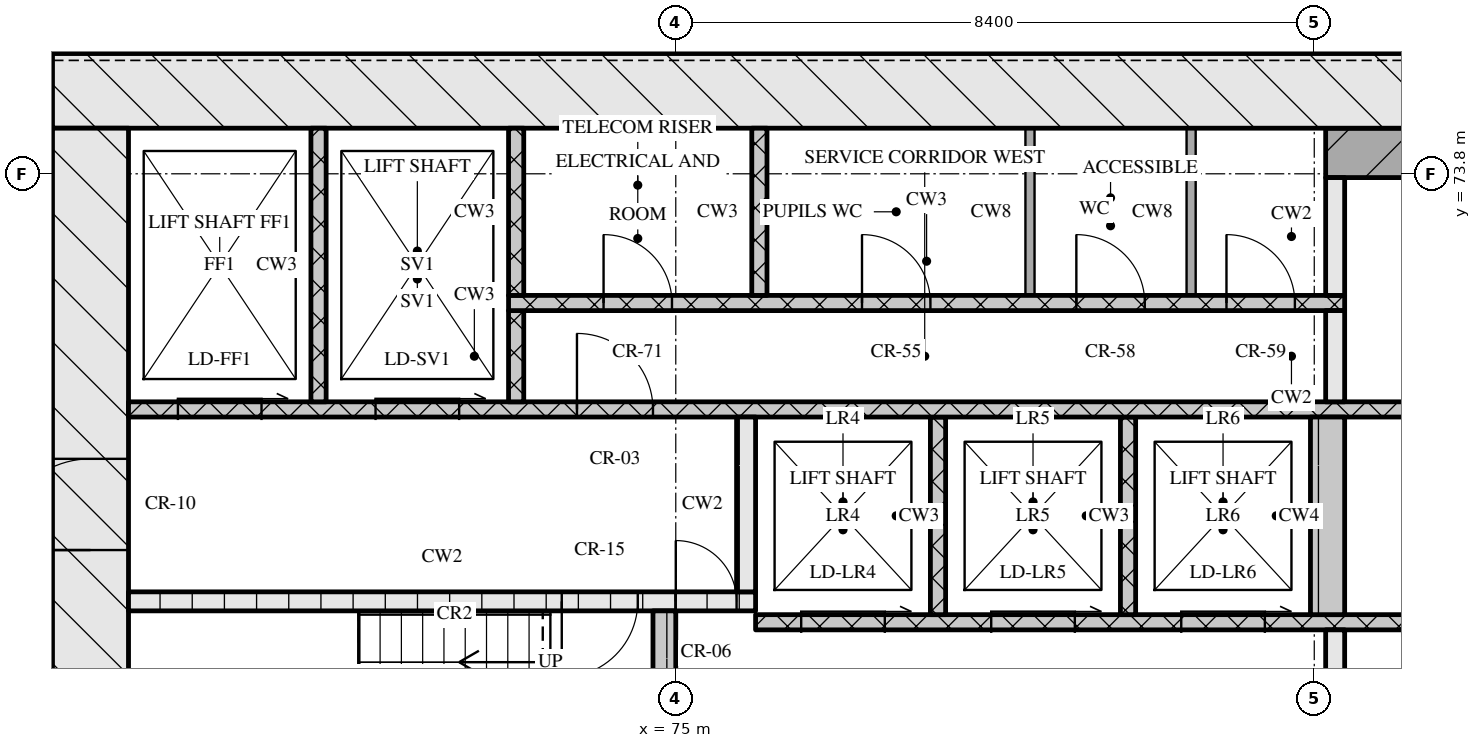
"""IFC4 building model, lengths in metres.
Left out: names, types, materials, properties, quantities, classifications, styles, units other than length and angle.
Written with IfcOpenShell. Run it as: python <this file> out.ifc"""

import sys

from ifc_helpers import new_model, si_unit, direction, frame, frame_2d, origin, place, context, subcontext, project, spatial, rectangle, extrude, element, fill, save


model = new_model("IFC4")
c1 = context("Model", 3, precision=1e-05, world=origin(), true_north=direction((0.0, 1.0)))
c2 = subcontext(c1, "Body", "Model", "MODEL_VIEW")
j1 = project(units=[si_unit("LENGTHUNIT", "METRE"), si_unit("PLANEANGLEUNIT", "RADIAN")], contexts=[c1])
p1 = place(None, origin())
s1 = spatial("IfcSite", under=j1, at=p1, CompositionType="ELEMENT")
p2 = place(p1, origin())
s2 = spatial("IfcBuilding", under=s1, at=p2, CompositionType="ELEMENT")
p3 = place(p2, frame((0.0, 0.0, 113.25)))
s3 = spatial("IfcBuildingStorey", under=s2, at=p3, CompositionType="ELEMENT", Elevation=113.25)
p4 = place(p3, frame((66.8, 74.9, 0.0), z_axis=(0.0, 0.0, 1.0), x_axis=(1.0, 0.0, 0.0)))
e1 = element("IfcWall", 1, at=p4, inside=s3, PredefinedType="SOLIDWALL", context=c2, shape_type="SweptSolid", body=[
    extrude(rectangle(XDim=41.6, YDim=1.0, at=frame_2d((20.8, 0.0))), origin(), (0.0, 0.0, 1.0), 3.32),
])
p5 = place(p3, frame((67.3, 62.4, 0.0), z_axis=(0.0, 0.0, 1.0), x_axis=(0.0, 1.0, 0.0)))
e2 = element("IfcWall", 2, at=p5, inside=s3, PredefinedType="SOLIDWALL", context=c2, shape_type="SweptSolid", body=[
    extrude(rectangle(XDim=12.0, YDim=1.0, at=frame_2d((6.0, 0.0))), origin(), (0.0, 0.0, 1.0), 3.32),
])
p6 = place(p5, frame((6.45, 0.0, 0.0)))
e3 = element("IfcOpeningElement", 3, at=p6, cuts=e2, PredefinedType="OPENING", context=c2, shape_type="SweptSolid", body=[
    extrude(rectangle(XDim=1.2, YDim=2.1, at=frame_2d((0.6, 1.05))), frame((0.0, 0.51, 0.0), z_axis=(0.0, -1.0, 0.0), x_axis=(1.0, 0.0, 0.0)), (0.0, 0.0, 1.0), 1.02),
])
p7 = place(p3, frame((74.85, 65.2, 0.0), z_axis=(0.0, 0.0, 1.0), x_axis=(0.0, 1.0, 0.0)))
e4 = element("IfcWall", 4, at=p7, inside=s3, PredefinedType="SOLIDWALL", context=c2, shape_type="SweptSolid", body=[
    extrude(rectangle(XDim=2.85, YDim=0.3, at=frame_2d((1.425, 0.0))), origin(), (0.0, 0.0, 1.0), 3.32),
])
p8 = place(p3, frame((83.675, 65.2, 0.0), z_axis=(0.0, 0.0, 1.0), x_axis=(0.0, 1.0, 0.0)))
e5 = element("IfcWall", 5, at=p8, inside=s3, PredefinedType="SOLIDWALL", context=c2, shape_type="SweptSolid", body=[
    extrude(rectangle(XDim=2.6, YDim=0.25, at=frame_2d((1.3, 0.0))), origin(), (0.0, 0.0, 1.0), 3.32),
])
p9 = place(p8, frame((0.7, 0.0, 0.0)))
e6 = element("IfcOpeningElement", 6, at=p9, cuts=e5, PredefinedType="OPENING", context=c2, shape_type="SweptSolid", body=[
    extrude(rectangle(XDim=1.2, YDim=2.1, at=frame_2d((0.6, 1.05))), frame((0.0, 0.135, 0.0), z_axis=(0.0, -1.0, 0.0), x_axis=(1.0, 0.0, 0.0)), (0.0, 0.0, 1.0), 0.27),
])
p10 = place(p3, frame((76.05, 67.9, 0.0), z_axis=(0.0, 0.0, 1.0), x_axis=(1.0, 0.0, 0.0)))
e7 = element("IfcWall", 7, at=p10, inside=s3, PredefinedType="SOLIDWALL", context=c2, shape_type="SweptSolid", body=[
    extrude(rectangle(XDim=23.1, YDim=0.2, at=frame_2d((11.55, 0.0))), origin(), (0.0, 0.0, 1.0), 3.32),
])
p11 = place(p10, frame((0.6, 0.0, 0.0)))
e8 = element("IfcOpeningElement", 8, at=p11, cuts=e7, PredefinedType="OPENING", context=c2, shape_type="SweptSolid", body=[
    extrude(rectangle(XDim=1.1, YDim=2.1, at=frame_2d((0.55, 1.05))), frame((0.0, 0.11, 0.0), z_axis=(0.0, -1.0, 0.0), x_axis=(1.0, 0.0, 0.0)), (0.0, 0.0, 1.0), 0.22),
])
p12 = place(p10, frame((3.1, 0.0, 0.0)))
e9 = element("IfcOpeningElement", 9, at=p12, cuts=e7, PredefinedType="OPENING", context=c2, shape_type="SweptSolid", body=[
    extrude(rectangle(XDim=1.1, YDim=2.1, at=frame_2d((0.55, 1.05))), frame((0.0, 0.11, 0.0), z_axis=(0.0, -1.0, 0.0), x_axis=(1.0, 0.0, 0.0)), (0.0, 0.0, 1.0), 0.22),
])
p13 = place(p10, frame((5.6, 0.0, 0.0)))
e10 = element("IfcOpeningElement", 10, at=p13, cuts=e7, PredefinedType="OPENING", context=c2, shape_type="SweptSolid", body=[
    extrude(rectangle(XDim=1.1, YDim=2.1, at=frame_2d((0.55, 1.05))), frame((0.0, 0.11, 0.0), z_axis=(0.0, -1.0, 0.0), x_axis=(1.0, 0.0, 0.0)), (0.0, 0.0, 1.0), 0.22),
])
p14 = place(p10, frame((9.7, 0.0, 0.0)))
e11 = element("IfcOpeningElement", 11, at=p14, cuts=e7, PredefinedType="OPENING", context=c2, shape_type="SweptSolid", body=[
    extrude(rectangle(XDim=0.9, YDim=2.1, at=frame_2d((0.45, 1.05))), frame((0.0, 0.11, 0.0), z_axis=(0.0, -1.0, 0.0), x_axis=(1.0, 0.0, 0.0)), (0.0, 0.0, 1.0), 0.22),
])
p15 = place(p10, frame((13.55, 0.0, 0.0)))
e12 = element("IfcOpeningElement", 12, at=p15, cuts=e7, PredefinedType="OPENING", context=c2, shape_type="SweptSolid", body=[
    extrude(rectangle(XDim=1.0, YDim=2.1, at=frame_2d((0.5, 1.05))), frame((0.0, 0.11, 0.0), z_axis=(0.0, -1.0, 0.0), x_axis=(1.0, 0.0, 0.0)), (0.0, 0.0, 1.0), 0.22),
])
for number, where, z_axis, x_axis in (
    (13, (78.45, 68.0, 0.0), (0.0, 0.0, 1.0), (0.0, 1.0, 0.0)),
    (14, (80.95, 68.0, 0.0), (0.0, 0.0, 1.0), (0.0, 1.0, 0.0)),
):
    element("IfcWall", number, at=place(p3, frame(where, z_axis=z_axis, x_axis=x_axis)), inside=s3, PredefinedType="SOLIDWALL", context=c2, shape_type="SweptSolid", body=[
        extrude(rectangle(XDim=2.6, YDim=0.2, at=frame_2d((1.3, 0.0))), origin(), (0.0, 0.0, 1.0), 3.32),
    ])
p16 = place(p3, frame((83.575, 68.0, 0.0), z_axis=(0.0, 0.0, 1.0), x_axis=(0.0, 1.0, 0.0)))
e15 = element("IfcWall", 15, at=p16, inside=s3, PredefinedType="SOLIDWALL", context=c2, shape_type="SweptSolid", body=[
    extrude(rectangle(XDim=2.6, YDim=0.45, at=frame_2d((1.3, 0.0))), origin(), (0.0, 0.0, 1.0), 3.32),
])
p17 = place(p3, frame((67.8, 68.175, 0.0), z_axis=(0.0, 0.0, 1.0), x_axis=(1.0, 0.0, 0.0)))
e16 = element("IfcWall", 16, at=p17, inside=s3, PredefinedType="SOLIDWALL", context=c2, shape_type="SweptSolid", body=[
    extrude(rectangle(XDim=8.25, YDim=0.25, at=frame_2d((4.125, 0.0))), origin(), (0.0, 0.0, 1.0), 3.32),
])
p18 = place(p17, frame((5.7, 0.0, 0.0)))
e17 = element("IfcOpeningElement", 17, at=p18, cuts=e16, PredefinedType="OPENING", context=c2, shape_type="SweptSolid", body=[
    extrude(rectangle(XDim=1.0, YDim=2.1, at=frame_2d((0.5, 1.05))), frame((0.0, 0.135, 0.0), z_axis=(0.0, -1.0, 0.0), x_axis=(1.0, 0.0, 0.0)), (0.0, 0.0, 1.0), 0.27),
])
p19 = place(p17, frame((7.2, 0.0, 0.0)))
e18 = element("IfcOpeningElement", 18, at=p19, cuts=e16, PredefinedType="OPENING", context=c2, shape_type="SweptSolid", body=[
    extrude(rectangle(XDim=0.8, YDim=2.1, at=frame_2d((0.4, 1.05))), frame((0.0, 0.135, 0.0), z_axis=(0.0, -1.0, 0.0), x_axis=(1.0, 0.0, 0.0)), (0.0, 0.0, 1.0), 0.27),
])
p20 = place(p3, frame((75.925, 68.3, 0.0), z_axis=(0.0, 0.0, 1.0), x_axis=(0.0, 1.0, 0.0)))
e19 = element("IfcWall", 19, at=p20, inside=s3, PredefinedType="SOLIDWALL", context=c2, shape_type="SweptSolid", body=[
    extrude(rectangle(XDim=2.3, YDim=0.25, at=frame_2d((1.15, 0.0))), origin(), (0.0, 0.0, 1.0), 3.32),
])
p21 = place(p3, frame((67.8, 70.7, 0.0), z_axis=(0.0, 0.0, 1.0), x_axis=(1.0, 0.0, 0.0)))
e20 = element("IfcWall", 20, at=p21, inside=s3, PredefinedType="SOLIDWALL", context=c2, shape_type="SweptSolid", body=[
    extrude(rectangle(XDim=39.6, YDim=0.2, at=frame_2d((19.8, 0.0))), origin(), (0.0, 0.0, 1.0), 3.32),
])
p22 = place(p21, frame((0.65, 0.0, 0.0)))
e21 = element("IfcOpeningElement", 21, at=p22, cuts=e20, PredefinedType="OPENING", context=c2, shape_type="SweptSolid", body=[
    extrude(rectangle(XDim=1.1, YDim=2.1, at=frame_2d((0.55, 1.05))), frame((0.0, 0.11, 0.0), z_axis=(0.0, -1.0, 0.0), x_axis=(1.0, 0.0, 0.0)), (0.0, 0.0, 1.0), 0.22),
])
p23 = place(p21, frame((3.25, 0.0, 0.0)))
e22 = element("IfcOpeningElement", 22, at=p23, cuts=e20, PredefinedType="OPENING", context=c2, shape_type="SweptSolid", body=[
    extrude(rectangle(XDim=1.1, YDim=2.1, at=frame_2d((0.55, 1.05))), frame((0.0, 0.11, 0.0), z_axis=(0.0, -1.0, 0.0), x_axis=(1.0, 0.0, 0.0)), (0.0, 0.0, 1.0), 0.22),
])
p24 = place(p21, frame((5.9, 0.0, 0.0)))
e23 = element("IfcOpeningElement", 23, at=p24, cuts=e20, PredefinedType="OPENING", context=c2, shape_type="SweptSolid", body=[
    extrude(rectangle(XDim=1.0, YDim=2.1, at=frame_2d((0.5, 1.05))), frame((0.0, 0.11, 0.0), z_axis=(0.0, -1.0, 0.0), x_axis=(1.0, 0.0, 0.0)), (0.0, 0.0, 1.0), 0.22),
])
p25 = place(p21, frame((21.7, 0.0, 0.0)))
e24 = element("IfcOpeningElement", 24, at=p25, cuts=e20, PredefinedType="OPENING", context=c2, shape_type="SweptSolid", body=[
    extrude(rectangle(XDim=1.0, YDim=2.1, at=frame_2d((0.5, 1.05))), frame((0.0, 0.11, 0.0), z_axis=(0.0, -1.0, 0.0), x_axis=(1.0, 0.0, 0.0)), (0.0, 0.0, 1.0), 0.22),
])
p26 = place(p21, frame((32.7, 0.0, 0.0)))
e25 = element("IfcOpeningElement", 25, at=p26, cuts=e20, PredefinedType="OPENING", context=c2, shape_type="SweptSolid", body=[
    extrude(rectangle(XDim=1.0, YDim=2.1, at=frame_2d((0.5, 1.05))), frame((0.0, 0.11, 0.0), z_axis=(0.0, -1.0, 0.0), x_axis=(1.0, 0.0, 0.0)), (0.0, 0.0, 1.0), 0.22),
])
p27 = place(p21, frame((35.25, 0.0, 0.0)))
e26 = element("IfcOpeningElement", 26, at=p27, cuts=e20, PredefinedType="OPENING", context=c2, shape_type="SweptSolid", body=[
    extrude(rectangle(XDim=1.1, YDim=2.1, at=frame_2d((0.55, 1.05))), frame((0.0, 0.11, 0.0), z_axis=(0.0, -1.0, 0.0), x_axis=(1.0, 0.0, 0.0)), (0.0, 0.0, 1.0), 0.22),
])
p28 = place(p21, frame((37.85, 0.0, 0.0)))
e27 = element("IfcOpeningElement", 27, at=p28, cuts=e20, PredefinedType="OPENING", context=c2, shape_type="SweptSolid", body=[
    extrude(rectangle(XDim=1.1, YDim=2.1, at=frame_2d((0.55, 1.05))), frame((0.0, 0.11, 0.0), z_axis=(0.0, -1.0, 0.0), x_axis=(1.0, 0.0, 0.0)), (0.0, 0.0, 1.0), 0.22),
])
p29 = place(p3, frame((70.3, 70.8, 0.0), z_axis=(0.0, 0.0, 1.0), x_axis=(0.0, 1.0, 0.0)))
e28 = element("IfcWall", 28, at=p29, inside=s3, PredefinedType="SOLIDWALL", context=c2, shape_type="SweptSolid", body=[
    extrude(rectangle(XDim=3.6, YDim=0.2, at=frame_2d((1.8, 0.0))), origin(), (0.0, 0.0, 1.0), 3.32),
])
p30 = place(p3, frame((72.9, 70.8, 0.0), z_axis=(0.0, 0.0, 1.0), x_axis=(0.0, 1.0, 0.0)))
e29 = element("IfcWall", 29, at=p30, inside=s3, PredefinedType="SOLIDWALL", context=c2, shape_type="SweptSolid", body=[
    extrude(rectangle(XDim=1.2, YDim=0.2, at=frame_2d((0.6, 0.0))), origin(), (0.0, 0.0, 1.0), 3.32),
])
p31 = place(p3, frame((83.675, 70.8, 0.0), z_axis=(0.0, 0.0, 1.0), x_axis=(0.0, 1.0, 0.0)))
e30 = element("IfcWall", 30, at=p31, inside=s3, PredefinedType="SOLIDWALL", context=c2, shape_type="SweptSolid", body=[
    extrude(rectangle(XDim=1.2, YDim=0.25, at=frame_2d((0.6, 0.0))), origin(), (0.0, 0.0, 1.0), 3.32),
])
p32 = place(p3, frame((72.8, 72.1, 0.0), z_axis=(0.0, 0.0, 1.0), x_axis=(1.0, 0.0, 0.0)))
e31 = element("IfcWall", 31, at=p32, inside=s3, PredefinedType="SOLIDWALL", context=c2, shape_type="SweptSolid", body=[
    extrude(rectangle(XDim=11.0, YDim=0.2, at=frame_2d((5.5, 0.0))), origin(), (0.0, 0.0, 1.0), 3.32),
])
p33 = place(p32, frame((1.25, 0.0, 0.0)))
e32 = element("IfcOpeningElement", 32, at=p33, cuts=e31, PredefinedType="OPENING", context=c2, shape_type="SweptSolid", body=[
    extrude(rectangle(XDim=0.9, YDim=2.1, at=frame_2d((0.45, 1.05))), frame((0.0, 0.11, 0.0), z_axis=(0.0, -1.0, 0.0), x_axis=(1.0, 0.0, 0.0)), (0.0, 0.0, 1.0), 0.22),
])
p34 = place(p32, frame((4.65, 0.0, 0.0)))
e33 = element("IfcOpeningElement", 33, at=p34, cuts=e31, PredefinedType="OPENING", context=c2, shape_type="SweptSolid", body=[
    extrude(rectangle(XDim=0.9, YDim=2.1, at=frame_2d((0.45, 1.05))), frame((0.0, 0.11, 0.0), z_axis=(0.0, -1.0, 0.0), x_axis=(1.0, 0.0, 0.0)), (0.0, 0.0, 1.0), 0.22),
])
p35 = place(p32, frame((7.47, 0.0, 0.0)))
e34 = element("IfcOpeningElement", 34, at=p35, cuts=e31, PredefinedType="OPENING", context=c2, shape_type="SweptSolid", body=[
    extrude(rectangle(XDim=0.9, YDim=2.1, at=frame_2d((0.45, 1.05))), frame((0.0, 0.11, 0.0), z_axis=(0.0, -1.0, 0.0), x_axis=(1.0, 0.0, 0.0)), (0.0, 0.0, 1.0), 0.22),
])
p36 = place(p32, frame((9.445, 0.0, 0.0)))
e35 = element("IfcOpeningElement", 35, at=p36, cuts=e31, PredefinedType="OPENING", context=c2, shape_type="SweptSolid", body=[
    extrude(rectangle(XDim=0.9, YDim=2.1, at=frame_2d((0.45, 1.05))), frame((0.0, 0.11, 0.0), z_axis=(0.0, -1.0, 0.0), x_axis=(1.0, 0.0, 0.0)), (0.0, 0.0, 1.0), 0.22),
])
for number, where, z_axis, x_axis in (
    (36, (72.9, 72.2, 0.0), (0.0, 0.0, 1.0), (0.0, 1.0, 0.0)),
    (37, (76.1, 72.2, 0.0), (0.0, 0.0, 1.0), (0.0, 1.0, 0.0)),
):
    element("IfcWall", number, at=place(p3, frame(where, z_axis=z_axis, x_axis=x_axis)), inside=s3, PredefinedType="SOLIDWALL", context=c2, shape_type="SweptSolid", body=[
        extrude(rectangle(XDim=2.2, YDim=0.2, at=frame_2d((1.1, 0.0))), origin(), (0.0, 0.0, 1.0), 3.32),
    ])
for number, where, z_axis, x_axis in (
    (38, (79.66, 72.2, 0.0), (0.0, 0.0, 1.0), (0.0, 1.0, 0.0)),
    (39, (81.78, 72.2, 0.0), (0.0, 0.0, 1.0), (0.0, 1.0, 0.0)),
):
    element("IfcWall", number, at=place(p3, frame(where, z_axis=z_axis, x_axis=x_axis)), inside=s3, PredefinedType="PARTITIONING", context=c2, shape_type="SweptSolid", body=[
        extrude(rectangle(XDim=2.2, YDim=0.12, at=frame_2d((1.1, 0.0))), origin(), (0.0, 0.0, 1.0), 3.32),
    ])
p37 = place(p3, frame((83.675, 72.2, 0.0), z_axis=(0.0, 0.0, 1.0), x_axis=(0.0, 1.0, 0.0)))
e40 = element("IfcWall", 40, at=p37, inside=s3, PredefinedType="SOLIDWALL", context=c2, shape_type="SweptSolid", body=[
    extrude(rectangle(XDim=1.55, YDim=0.25, at=frame_2d((0.775, 0.0))), origin(), (0.0, 0.0, 1.0), 3.32),
])
p38 = place(p3, frame((83.55, 74.075, 0.0), z_axis=(0.0, 0.0, 1.0), x_axis=(1.0, 0.0, 0.0)))
e41 = element("IfcWall", 41, at=p38, inside=s3, PredefinedType="SOLIDWALL", context=c2, shape_type="SweptSolid", body=[
    extrude(rectangle(XDim=8.1, YDim=0.65, at=frame_2d((4.05, 0.0))), origin(), (0.0, 0.0, 1.0), 3.32),
])
p39 = place(p11, origin())
e42 = element("IfcDoor", 42, at=p39, inside=s3, OperationType="SLIDING_TO_RIGHT", PredefinedType="DOOR", context=c2, shape_type="SweptSolid", body=[
    extrude(rectangle(XDim=1.1, YDim=2.1, at=frame_2d((0.55, 1.05))), frame((0.0, 0.025, 0.0), z_axis=(0.0, -1.0, 0.0), x_axis=(1.0, 0.0, 0.0)), (0.0, 0.0, 1.0), 0.05),
])
fill(e8, e42)
p40 = place(p12, origin())
e43 = element("IfcDoor", 43, at=p40, inside=s3, OperationType="SLIDING_TO_RIGHT", PredefinedType="DOOR", context=c2, shape_type="SweptSolid", body=[
    extrude(rectangle(XDim=1.1, YDim=2.1, at=frame_2d((0.55, 1.05))), frame((0.0, 0.025, 0.0), z_axis=(0.0, -1.0, 0.0), x_axis=(1.0, 0.0, 0.0)), (0.0, 0.0, 1.0), 0.05),
])
fill(e9, e43)
p41 = place(p13, origin())
e44 = element("IfcDoor", 44, at=p41, inside=s3, OperationType="SLIDING_TO_RIGHT", PredefinedType="DOOR", context=c2, shape_type="SweptSolid", body=[
    extrude(rectangle(XDim=1.1, YDim=2.1, at=frame_2d((0.55, 1.05))), frame((0.0, 0.025, 0.0), z_axis=(0.0, -1.0, 0.0), x_axis=(1.0, 0.0, 0.0)), (0.0, 0.0, 1.0), 0.05),
])
fill(e10, e44)
p42 = place(p18, origin())
e45 = element("IfcDoor", 45, at=p42, inside=s3, OperationType="SINGLE_SWING_RIGHT", PredefinedType="DOOR", context=c2, shape_type="SweptSolid", body=[
    extrude(rectangle(XDim=1.0, YDim=2.1, at=frame_2d((0.5, 1.05))), frame((0.0, 0.025, 0.0), z_axis=(0.0, -1.0, 0.0), x_axis=(1.0, 0.0, 0.0)), (0.0, 0.0, 1.0), 0.05),
])
fill(e17, e45)
p43 = place(p19, origin())
e46 = element("IfcDoor", 46, at=p43, inside=s3, OperationType="SINGLE_SWING_LEFT", PredefinedType="DOOR", context=c2, shape_type="SweptSolid", body=[
    extrude(rectangle(XDim=0.8, YDim=2.1, at=frame_2d((0.4, 1.05))), frame((0.0, 0.025, 0.0), z_axis=(0.0, -1.0, 0.0), x_axis=(1.0, 0.0, 0.0)), (0.0, 0.0, 1.0), 0.05),
])
fill(e18, e46)
p44 = place(p6, origin())
e47 = element("IfcDoor", 47, at=p44, inside=s3, OperationType="SINGLE_SWING_LEFT", PredefinedType="DOOR", context=c2, shape_type="SweptSolid", body=[
    extrude(rectangle(XDim=1.2, YDim=2.1, at=frame_2d((0.6, 1.05))), frame((0.0, 0.025, 0.0), z_axis=(0.0, -1.0, 0.0), x_axis=(1.0, 0.0, 0.0)), (0.0, 0.0, 1.0), 0.05),
])
fill(e3, e47)
p45 = place(p22, origin())
e48 = element("IfcDoor", 48, at=p45, inside=s3, OperationType="SLIDING_TO_RIGHT", PredefinedType="DOOR", context=c2, shape_type="SweptSolid", body=[
    extrude(rectangle(XDim=1.1, YDim=2.1, at=frame_2d((0.55, 1.05))), frame((0.0, 0.025, 0.0), z_axis=(0.0, -1.0, 0.0), x_axis=(1.0, 0.0, 0.0)), (0.0, 0.0, 1.0), 0.05),
])
fill(e21, e48)
p46 = place(p23, origin())
e49 = element("IfcDoor", 49, at=p46, inside=s3, OperationType="SLIDING_TO_RIGHT", PredefinedType="DOOR", context=c2, shape_type="SweptSolid", body=[
    extrude(rectangle(XDim=1.1, YDim=2.1, at=frame_2d((0.55, 1.05))), frame((0.0, 0.025, 0.0), z_axis=(0.0, -1.0, 0.0), x_axis=(1.0, 0.0, 0.0)), (0.0, 0.0, 1.0), 0.05),
])
fill(e22, e49)
p47 = place(p24, origin())
e50 = element("IfcDoor", 50, at=p47, inside=s3, OperationType="SINGLE_SWING_LEFT", PredefinedType="DOOR", context=c2, shape_type="SweptSolid", body=[
    extrude(rectangle(XDim=1.0, YDim=2.1, at=frame_2d((0.5, 1.05))), frame((0.0, 0.025, 0.0), z_axis=(0.0, -1.0, 0.0), x_axis=(1.0, 0.0, 0.0)), (0.0, 0.0, 1.0), 0.05),
])
fill(e23, e50)
p48 = place(p33, origin())
e51 = element("IfcDoor", 51, at=p48, inside=s3, OperationType="SINGLE_SWING_LEFT", PredefinedType="DOOR", context=c2, shape_type="SweptSolid", body=[
    extrude(rectangle(XDim=0.9, YDim=2.1, at=frame_2d((0.45, 1.05))), frame((0.0, 0.025, 0.0), z_axis=(0.0, -1.0, 0.0), x_axis=(1.0, 0.0, 0.0)), (0.0, 0.0, 1.0), 0.05),
])
fill(e32, e51)
p49 = place(p34, origin())
e52 = element("IfcDoor", 52, at=p49, inside=s3, OperationType="SINGLE_SWING_LEFT", PredefinedType="DOOR", context=c2, shape_type="SweptSolid", body=[
    extrude(rectangle(XDim=0.9, YDim=2.1, at=frame_2d((0.45, 1.05))), frame((0.0, 0.025, 0.0), z_axis=(0.0, -1.0, 0.0), x_axis=(1.0, 0.0, 0.0)), (0.0, 0.0, 1.0), 0.05),
])
fill(e33, e52)
p50 = place(p35, origin())
e53 = element("IfcDoor", 53, at=p50, inside=s3, OperationType="SINGLE_SWING_LEFT", PredefinedType="DOOR", context=c2, shape_type="SweptSolid", body=[
    extrude(rectangle(XDim=0.9, YDim=2.1, at=frame_2d((0.45, 1.05))), frame((0.0, 0.025, 0.0), z_axis=(0.0, -1.0, 0.0), x_axis=(1.0, 0.0, 0.0)), (0.0, 0.0, 1.0), 0.05),
])
fill(e34, e53)
p51 = place(p36, origin())
e54 = element("IfcDoor", 54, at=p51, inside=s3, OperationType="SINGLE_SWING_LEFT", PredefinedType="DOOR", context=c2, shape_type="SweptSolid", body=[
    extrude(rectangle(XDim=0.9, YDim=2.1, at=frame_2d((0.45, 1.05))), frame((0.0, 0.025, 0.0), z_axis=(0.0, -1.0, 0.0), x_axis=(1.0, 0.0, 0.0)), (0.0, 0.0, 1.0), 0.05),
])
fill(e35, e54)
save(model, sys.argv[1])
